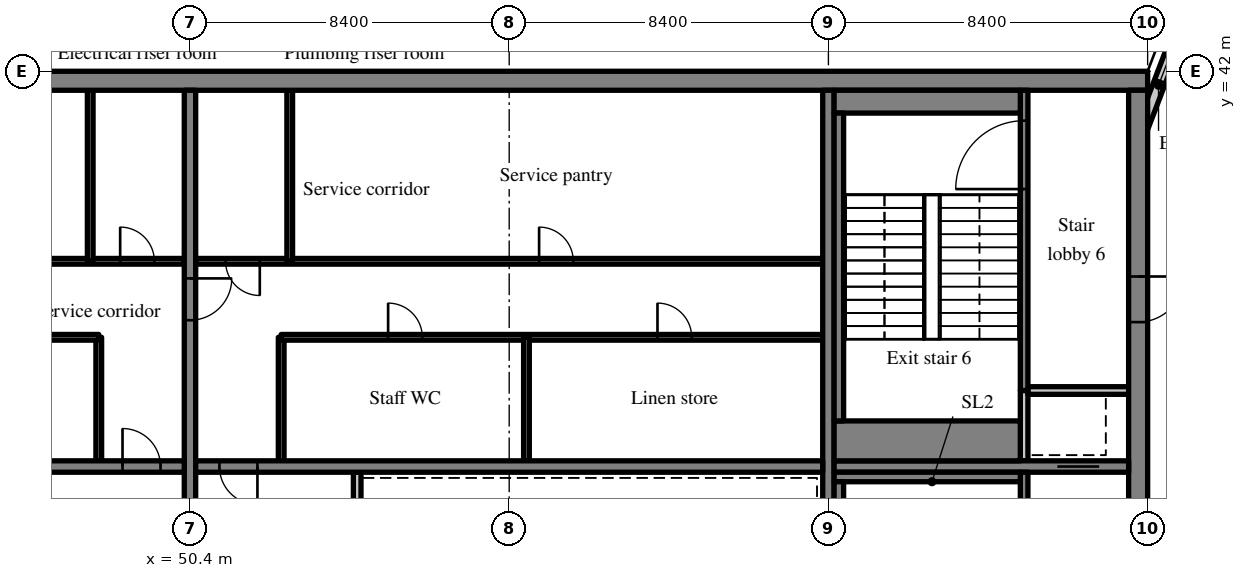
"""IFC4 building model, lengths in metres.
Left out: names, types, materials, properties, quantities, classifications, styles, units other than length and angle.
Written with IfcOpenShell. Run it as: python <this file> out.ifc"""

import sys

from ifc_helpers import new_model, si_unit, direction, frame, frame_2d, origin, place, context, subcontext, project, spatial, rectangle, extrude, source, transform, mapped, element, fill, save


model = new_model("IFC4")
c1 = context("Model", 3, precision=1e-05, world=origin(), true_north=direction((0.0, 1.0)))
c2 = subcontext(c1, "Body", "Model", "MODEL_VIEW")
j1 = project(units=[si_unit("LENGTHUNIT", "METRE"), si_unit("PLANEANGLEUNIT", "RADIAN")], contexts=[c1])
p1 = place(None, origin())
s1 = spatial("IfcSite", under=j1, at=p1, CompositionType="ELEMENT")
p2 = place(p1, origin())
s2 = spatial("IfcBuilding", under=s1, at=p2, CompositionType="ELEMENT")
p3 = place(p2, frame((0.0, 0.0, 285.7)))
s3 = spatial("IfcBuildingStorey", under=s2, at=p3, CompositionType="ELEMENT", Elevation=285.7)
m1 = source(origin(), c2, "Body", "SweptSolid", [
    extrude(rectangle(XDim=50.4, YDim=0.5, at=frame_2d((25.2, 0.0))), origin(), (0.0, 0.0, 1.0), 3.72),
])
p4 = place(p3, frame((25.2, 41.75, 0.0), z_axis=(0.0, 0.0, 1.0), x_axis=(1.0, 0.0, 0.0)))
e1 = element("IfcWall", 1, at=p4, inside=s3, PredefinedType="SHEAR", context=c2, shape_type="MappedRepresentation", body=[
    mapped(m1, transform((0.0, 0.0, 0.0), scale=1.0)),
])
m2 = source(origin(), c2, "Body", "SweptSolid", [
    extrude(rectangle(XDim=19.0, YDim=0.5, at=frame_2d((9.5, 0.0))), origin(), (0.0, 0.0, 1.0), 3.72),
])
p5 = place(p3, frame((75.35, 22.5, 0.0), z_axis=(0.0, 0.0, 1.0), x_axis=(0.0, 1.0, 0.0)))
e2 = element("IfcWall", 2, at=p5, inside=s3, PredefinedType="SHEAR", context=c2, shape_type="MappedRepresentation", body=[
    mapped(m2, transform((0.0, 0.0, 0.0), scale=1.0)),
])
m3 = source(origin(), c2, "Body", "SweptSolid", [
    extrude(rectangle(XDim=1.2, YDim=2.1, at=frame_2d((0.6, 1.05))), frame((0.0, 0.26, 0.0), z_axis=(0.0, -1.0, 0.0), x_axis=(1.0, 0.0, 0.0)), (0.0, 0.0, 1.0), 0.52),
])
p6 = place(p5, frame((12.9, 0.0, 0.0)))
e3 = element("IfcOpeningElement", 3, at=p6, cuts=e2, PredefinedType="OPENING", context=c2, shape_type="MappedRepresentation", body=[
    mapped(m3, transform((0.0, 0.0, 0.0), scale=1.0)),
])
m4 = source(origin(), c2, "Body", "SweptSolid", [
    extrude(rectangle(XDim=19.0, YDim=0.3, at=frame_2d((9.5, 0.0))), origin(), (0.0, 0.0, 1.0), 3.72),
])
p7 = place(p3, frame((50.4, 22.5, 0.0), z_axis=(0.0, 0.0, 1.0), x_axis=(0.0, 1.0, 0.0)))
e4 = element("IfcWall", 4, at=p7, inside=s3, PredefinedType="SHEAR", context=c2, shape_type="MappedRepresentation", body=[
    mapped(m4, transform((0.0, 0.0, 0.0), scale=1.0)),
])
m5 = source(origin(), c2, "Body", "SweptSolid", [
    extrude(rectangle(XDim=1.1, YDim=2.1, at=frame_2d((0.55, 1.05))), frame((0.0, 0.16, 0.0), z_axis=(0.0, -1.0, 0.0), x_axis=(1.0, 0.0, 0.0)), (0.0, 0.0, 1.0), 0.32),
])
p8 = place(p7, frame((12.95, 0.0, 0.0)))
e5 = element("IfcOpeningElement", 5, at=p8, cuts=e4, PredefinedType="OPENING", context=c2, shape_type="MappedRepresentation", body=[
    mapped(m5, transform((0.0, 0.0, 0.0), scale=1.0)),
])
p9 = place(p3, frame((67.2, 22.5, 0.0), z_axis=(0.0, 0.0, 1.0), x_axis=(0.0, 1.0, 0.0)))
e6 = element("IfcWall", 6, at=p9, inside=s3, PredefinedType="SHEAR", context=c2, shape_type="MappedRepresentation", body=[
    mapped(m4, transform((0.0, 0.0, 0.0), scale=1.0)),
])
m6 = source(origin(), c2, "Body", "SweptSolid", [
    extrude(rectangle(XDim=16.5, YDim=0.3, at=frame_2d((8.25, 0.0))), origin(), (0.0, 0.0, 1.0), 3.72),
])
p10 = place(p3, frame((33.75, 31.6, 0.0), z_axis=(0.0, 0.0, 1.0), x_axis=(1.0, 0.0, 0.0)))
e7 = element("IfcWall", 7, at=p10, inside=s3, PredefinedType="SHEAR", context=c2, shape_type="MappedRepresentation", body=[
    mapped(m6, transform((0.0, 0.0, 0.0), scale=1.0)),
])
m7 = source(origin(), c2, "Body", "SweptSolid", [
    extrude(rectangle(XDim=1.0, YDim=2.1, at=frame_2d((0.5, 1.05))), frame((0.0, 0.16, 0.0), z_axis=(0.0, -1.0, 0.0), x_axis=(1.0, 0.0, 0.0)), (0.0, 0.0, 1.0), 0.32),
])
p11 = place(p10, frame((14.875, 0.0, 0.0)))
e8 = element("IfcOpeningElement", 8, at=p11, cuts=e7, PredefinedType="OPENING", context=c2, shape_type="MappedRepresentation", body=[
    mapped(m7, transform((0.0, 0.0, 0.0), scale=1.0)),
])
p12 = place(p3, frame((50.55, 31.6, 0.0), z_axis=(0.0, 0.0, 1.0), x_axis=(1.0, 0.0, 0.0)))
e9 = element("IfcWall", 9, at=p12, inside=s3, PredefinedType="SHEAR", context=c2, shape_type="MappedRepresentation", body=[
    mapped(m6, transform((0.0, 0.0, 0.0), scale=1.0)),
])
p13 = place(p12, frame((0.625, 0.0, 0.0)))
e10 = element("IfcOpeningElement", 10, at=p13, cuts=e9, PredefinedType="OPENING", context=c2, shape_type="MappedRepresentation", body=[
    mapped(m7, transform((0.0, 0.0, 0.0), scale=1.0)),
])
m8 = source(origin(), c2, "Body", "SweptSolid", [
    extrude(rectangle(XDim=7.75, YDim=0.3, at=frame_2d((3.875, 0.0))), origin(), (0.0, 0.0, 1.0), 3.72),
])
p14 = place(p3, frame((67.35, 31.6, 0.0), z_axis=(0.0, 0.0, 1.0), x_axis=(1.0, 0.0, 0.0)))
e11 = element("IfcWall", 11, at=p14, inside=s3, PredefinedType="SHEAR", context=c2, shape_type="MappedRepresentation", body=[
    mapped(m8, transform((0.0, 0.0, 0.0), scale=1.0)),
])
p15 = place(p14, frame((5.875, 0.0, 0.0)))
e12 = element("IfcOpeningElement", 12, at=p15, cuts=e11, PredefinedType="OPENING", context=c2, shape_type="MappedRepresentation", body=[
    mapped(m5, transform((0.0, 0.0, 0.0), scale=1.0)),
])
m9 = source(origin(), c2, "Body", "SweptSolid", [
    extrude(rectangle(XDim=3.559, YDim=0.3, at=frame_2d((1.78, 0.0))), origin(), (0.0, 0.0, 1.0), 3.72),
])
p16 = place(p3, frame((76.523, 43.292, 0.0), z_axis=(0.0, 0.0, 1.0), x_axis=(-0.35779745313, -0.933799219604, 0.0)))
e13 = element("IfcWall", 13, at=p16, inside=s3, PredefinedType="SOLIDWALL", context=c2, shape_type="MappedRepresentation", body=[
    mapped(m9, transform((0.0, 0.0, 0.0), scale=1.0)),
])
m10 = source(origin(), c2, "Body", "SweptSolid", [
    extrude(rectangle(XDim=1.5, YDim=2.0, at=frame_2d((0.75, 1.0))), frame((0.0, 0.16, 0.0), z_axis=(0.0, -1.0, 0.0), x_axis=(1.0, 0.0, 0.0)), (0.0, 0.0, 1.0), 0.32),
])
p17 = place(p16, frame((0.156, 0.0, 0.9)))
e14 = element("IfcOpeningElement", 14, at=p17, cuts=e13, PredefinedType="OPENING", context=c2, shape_type="MappedRepresentation", body=[
    mapped(m10, transform((0.0, 0.0, 0.0), scale=1.0)),
])
m11 = source(origin(), c2, "Body", "SweptSolid", [
    extrude(rectangle(XDim=3.25, YDim=0.15, at=frame_2d((1.625, 0.0))), origin(), (0.0, 0.0, 1.0), 3.72),
])
p18 = place(p3, frame((48.0, 31.75, 0.0), z_axis=(0.0, 0.0, 1.0), x_axis=(0.0, 1.0, 0.0)))
e15 = element("IfcWall", 15, at=p18, inside=s3, PredefinedType="PARTITIONING", context=c2, shape_type="MappedRepresentation", body=[
    mapped(m11, transform((0.0, 0.0, 0.0), scale=1.0)),
])
m12 = source(origin(), c2, "Body", "SweptSolid", [
    extrude(rectangle(XDim=14.25, YDim=0.15, at=frame_2d((7.125, 0.0))), origin(), (0.0, 0.0, 1.0), 3.72),
])
p19 = place(p3, frame((33.75, 35.0, 0.0), z_axis=(0.0, 0.0, 1.0), x_axis=(1.0, 0.0, 0.0)))
e16 = element("IfcWall", 16, at=p19, inside=s3, PredefinedType="PARTITIONING", context=c2, shape_type="MappedRepresentation", body=[
    mapped(m12, transform((0.0, 0.0, 0.0), scale=1.0)),
])
m13 = source(origin(), c2, "Body", "SweptSolid", [
    extrude(rectangle(XDim=0.9, YDim=2.1, at=frame_2d((0.45, 1.05))), frame((0.0, 0.085, 0.0), z_axis=(0.0, -1.0, 0.0), x_axis=(1.0, 0.0, 0.0)), (0.0, 0.0, 1.0), 0.17),
])
p20 = place(p19, frame((6.637, 0.0, 0.0)))
e17 = element("IfcOpeningElement", 17, at=p20, cuts=e16, PredefinedType="OPENING", context=c2, shape_type="MappedRepresentation", body=[
    mapped(m13, transform((0.0, 0.0, 0.0), scale=1.0)),
])
m14 = source(origin(), c2, "Body", "SweptSolid", [
    extrude(rectangle(XDim=16.5, YDim=0.15, at=frame_2d((8.25, 0.0))), origin(), (0.0, 0.0, 1.0), 3.72),
])
p21 = place(p3, frame((33.75, 37.0, 0.0), z_axis=(0.0, 0.0, 1.0), x_axis=(1.0, 0.0, 0.0)))
e18 = element("IfcWall", 18, at=p21, inside=s3, PredefinedType="PARTITIONING", context=c2, shape_type="MappedRepresentation", body=[
    mapped(m14, transform((0.0, 0.0, 0.0), scale=1.0)),
])
p22 = place(p21, frame((0.787, 0.0, 0.0)))
e19 = element("IfcOpeningElement", 19, at=p22, cuts=e18, PredefinedType="OPENING", context=c2, shape_type="MappedRepresentation", body=[
    mapped(m13, transform((0.0, 0.0, 0.0), scale=1.0)),
])
p23 = place(p21, frame((3.675, 0.0, 0.0)))
e20 = element("IfcOpeningElement", 20, at=p23, cuts=e18, PredefinedType="OPENING", context=c2, shape_type="MappedRepresentation", body=[
    mapped(m13, transform((0.0, 0.0, 0.0), scale=1.0)),
])
p24 = place(p21, frame((9.45, 0.0, 0.0)))
e21 = element("IfcOpeningElement", 21, at=p24, cuts=e18, PredefinedType="OPENING", context=c2, shape_type="MappedRepresentation", body=[
    mapped(m13, transform((0.0, 0.0, 0.0), scale=1.0)),
])
p25 = place(p21, frame((14.813, 0.0, 0.0)))
e22 = element("IfcOpeningElement", 22, at=p25, cuts=e18, PredefinedType="OPENING", context=c2, shape_type="MappedRepresentation", body=[
    mapped(m13, transform((0.0, 0.0, 0.0), scale=1.0)),
])
m15 = source(origin(), c2, "Body", "SweptSolid", [
    extrude(rectangle(XDim=4.5, YDim=0.15, at=frame_2d((2.25, 0.0))), origin(), (0.0, 0.0, 1.0), 3.72),
])
p26 = place(p3, frame((47.775, 37.0, 0.0), z_axis=(0.0, 0.0, 1.0), x_axis=(0.0, 1.0, 0.0)))
e23 = element("IfcWall", 23, at=p26, inside=s3, PredefinedType="PARTITIONING", context=c2, shape_type="MappedRepresentation", body=[
    mapped(m15, transform((0.0, 0.0, 0.0), scale=1.0)),
])
m16 = source(origin(), c2, "Body", "SweptSolid", [
    extrude(rectangle(XDim=2.65, YDim=0.2, at=frame_2d((1.325, 0.0))), origin(), (0.0, 0.0, 1.0), 3.72),
])
p27 = place(p3, frame((54.8, 28.8, 0.0), z_axis=(0.0, 0.0, 1.0), x_axis=(0.0, 1.0, 0.0)))
e24 = element("IfcWall", 24, at=p27, inside=s3, PredefinedType="SOLIDWALL", context=c2, shape_type="MappedRepresentation", body=[
    mapped(m16, transform((0.0, 0.0, 0.0), scale=1.0)),
])
p28 = place(p3, frame((52.8, 31.75, 0.0), z_axis=(0.0, 0.0, 1.0), x_axis=(0.0, 1.0, 0.0)))
e25 = element("IfcWall", 25, at=p28, inside=s3, PredefinedType="PARTITIONING", context=c2, shape_type="MappedRepresentation", body=[
    mapped(m11, transform((0.0, 0.0, 0.0), scale=1.0)),
])
p29 = place(p3, frame((67.05, 35.0, 0.0), z_axis=(0.0, 0.0, 1.0), x_axis=(-1.0, 0.0, 0.0)))
e26 = element("IfcWall", 26, at=p29, inside=s3, PredefinedType="PARTITIONING", context=c2, shape_type="MappedRepresentation", body=[
    mapped(m12, transform((0.0, 0.0, 0.0), scale=1.0)),
])
p30 = place(p29, frame((3.448, 0.0, 0.0)))
e27 = element("IfcOpeningElement", 27, at=p30, cuts=e26, PredefinedType="OPENING", context=c2, shape_type="MappedRepresentation", body=[
    mapped(m13, transform((0.0, 0.0, 0.0), scale=1.0)),
])
p31 = place(p29, frame((10.536, 0.0, 0.0)))
e28 = element("IfcOpeningElement", 28, at=p31, cuts=e26, PredefinedType="OPENING", context=c2, shape_type="MappedRepresentation", body=[
    mapped(m13, transform((0.0, 0.0, 0.0), scale=1.0)),
])
p32 = place(p3, frame((67.05, 37.0, 0.0), z_axis=(0.0, 0.0, 1.0), x_axis=(-1.0, 0.0, 0.0)))
e29 = element("IfcWall", 29, at=p32, inside=s3, PredefinedType="PARTITIONING", context=c2, shape_type="MappedRepresentation", body=[
    mapped(m14, transform((0.0, 0.0, 0.0), scale=1.0)),
])
p33 = place(p32, frame((6.563, 0.0, 0.0)))
e30 = element("IfcOpeningElement", 30, at=p33, cuts=e29, PredefinedType="OPENING", context=c2, shape_type="MappedRepresentation", body=[
    mapped(m13, transform((0.0, 0.0, 0.0), scale=1.0)),
])
p34 = place(p32, frame((14.813, 0.0, 0.0)))
e31 = element("IfcOpeningElement", 31, at=p34, cuts=e29, PredefinedType="OPENING", context=c2, shape_type="MappedRepresentation", body=[
    mapped(m13, transform((0.0, 0.0, 0.0), scale=1.0)),
])
p35 = place(p3, frame((59.254, 31.75, 0.0), z_axis=(0.0, 0.0, 1.0), x_axis=(0.0, 1.0, 0.0)))
e32 = element("IfcWall", 32, at=p35, inside=s3, PredefinedType="PARTITIONING", context=c2, shape_type="MappedRepresentation", body=[
    mapped(m11, transform((0.0, 0.0, 0.0), scale=1.0)),
])
p36 = place(p3, frame((53.025, 37.0, 0.0), z_axis=(0.0, 0.0, 1.0), x_axis=(0.0, 1.0, 0.0)))
e33 = element("IfcWall", 33, at=p36, inside=s3, PredefinedType="PARTITIONING", context=c2, shape_type="MappedRepresentation", body=[
    mapped(m15, transform((0.0, 0.0, 0.0), scale=1.0)),
])
m17 = source(origin(), c2, "Body", "SweptSolid", [
    extrude(rectangle(XDim=8.95, YDim=0.2, at=frame_2d((4.475, 0.0))), origin(), (0.0, 0.0, 1.0), 3.72),
])
p37 = place(p3, frame((72.35, 22.5, 0.0), z_axis=(0.0, 0.0, 1.0), x_axis=(0.0, 1.0, 0.0)))
e34 = element("IfcWall", 34, at=p37, inside=s3, PredefinedType="SOLIDWALL", context=c2, shape_type="MappedRepresentation", body=[
    mapped(m17, transform((0.0, 0.0, 0.0), scale=1.0)),
])
m18 = source(origin(), c2, "Body", "SweptSolid", [
    extrude(rectangle(XDim=1.2, YDim=2.1, at=frame_2d((0.6, 1.05))), frame((0.0, 0.11, 0.0), z_axis=(0.0, -1.0, 0.0), x_axis=(1.0, 0.0, 0.0)), (0.0, 0.0, 1.0), 0.22),
])
p38 = place(p37, frame((7.0, 0.0, 0.0)))
e35 = element("IfcOpeningElement", 35, at=p38, cuts=e34, PredefinedType="OPENING", context=c2, shape_type="MappedRepresentation", body=[
    mapped(m18, transform((0.0, 0.0, 0.0), scale=1.0)),
])
m19 = source(origin(), c2, "Body", "SweptSolid", [
    extrude(rectangle(XDim=1.85, YDim=0.2, at=frame_2d((0.925, 0.0))), origin(), (0.0, 0.0, 1.0), 3.72),
])
p39 = place(p3, frame((72.35, 31.75, 0.0), z_axis=(0.0, 0.0, 1.0), x_axis=(0.0, 1.0, 0.0)))
e36 = element("IfcWall", 36, at=p39, inside=s3, PredefinedType="SOLIDWALL", context=c2, shape_type="MappedRepresentation", body=[
    mapped(m19, transform((0.0, 0.0, 0.0), scale=1.0)),
])
m20 = source(origin(), c2, "Body", "SweptSolid", [
    extrude(rectangle(XDim=2.65, YDim=0.2, at=frame_2d((1.325, 0.0))), origin(), (0.0, 0.0, 1.0), 3.72),
])
p40 = place(p3, frame((72.45, 33.6, 0.0), z_axis=(0.0, 0.0, 1.0), x_axis=(1.0, 0.0, 0.0)))
e37 = element("IfcWall", 37, at=p40, inside=s3, PredefinedType="SOLIDWALL", context=c2, shape_type="MappedRepresentation", body=[
    mapped(m20, transform((0.0, 0.0, 0.0), scale=1.0)),
])
m21 = source(origin(), c2, "Body", "SweptSolid", [
    extrude(rectangle(XDim=7.9, YDim=0.2, at=frame_2d((3.95, 0.0))), origin(), (0.0, 0.0, 1.0), 3.72),
])
p41 = place(p3, frame((72.35, 33.6, 0.0), z_axis=(0.0, 0.0, 1.0), x_axis=(0.0, 1.0, 0.0)))
e38 = element("IfcWall", 38, at=p41, inside=s3, PredefinedType="SOLIDWALL", context=c2, shape_type="MappedRepresentation", body=[
    mapped(m21, transform((0.0, 0.0, 0.0), scale=1.0)),
])
m22 = source(origin(), c2, "Body", "SweptSolid", [
    extrude(rectangle(XDim=1.8, YDim=2.1, at=frame_2d((0.9, 1.05))), frame((0.0, 0.11, 0.0), z_axis=(0.0, -1.0, 0.0), x_axis=(1.0, 0.0, 0.0)), (0.0, 0.0, 1.0), 0.22),
])
p42 = place(p41, frame((5.3, 0.0, 0.0)))
e39 = element("IfcOpeningElement", 39, at=p42, cuts=e38, PredefinedType="OPENING", context=c2, shape_type="MappedRepresentation", body=[
    mapped(m22, transform((0.0, 0.0, 0.0), scale=1.0)),
])
m23 = source(origin(), c2, "Body", "SweptSolid", [
    extrude(rectangle(XDim=4.9, YDim=0.25, at=frame_2d((2.45, 0.0))), origin(), (0.0, 0.0, 1.0), 3.72),
])
p43 = place(p3, frame((67.35, 31.325, 0.0), z_axis=(0.0, 0.0, 1.0), x_axis=(1.0, 0.0, 0.0)))
e40 = element("IfcWall", 40, at=p43, inside=s3, PredefinedType="SOLIDWALL", context=c2, shape_type="MappedRepresentation", body=[
    mapped(m23, transform((0.0, 0.0, 0.0), scale=1.0)),
])
m24 = source(origin(), c2, "Body", "SweptSolid", [
    extrude(rectangle(XDim=8.1, YDim=0.25, at=frame_2d((4.05, 0.0))), origin(), (0.0, 0.0, 1.0), 3.72),
])
p44 = place(p3, frame((67.475, 23.1, 0.0), z_axis=(0.0, 0.0, 1.0), x_axis=(0.0, 1.0, 0.0)))
e41 = element("IfcWall", 41, at=p44, inside=s3, PredefinedType="SOLIDWALL", context=c2, shape_type="MappedRepresentation", body=[
    mapped(m24, transform((0.0, 0.0, 0.0), scale=1.0)),
])
m25 = source(origin(), c2, "Body", "SweptSolid", [
    extrude(rectangle(XDim=4.9, YDim=0.6, at=frame_2d((2.45, 0.0))), origin(), (0.0, 0.0, 1.0), 3.72),
])
p45 = place(p3, frame((67.35, 41.2, 0.0), z_axis=(0.0, 0.0, 1.0), x_axis=(1.0, 0.0, 0.0)))
e42 = element("IfcWall", 42, at=p45, inside=s3, PredefinedType="SOLIDWALL", context=c2, shape_type="MappedRepresentation", body=[
    mapped(m25, transform((0.0, 0.0, 0.0), scale=1.0)),
])
m26 = source(origin(), c2, "Body", "SweptSolid", [
    extrude(rectangle(XDim=4.9, YDim=1.05, at=frame_2d((2.45, 0.0))), origin(), (0.0, 0.0, 1.0), 3.72),
])
p46 = place(p3, frame((67.35, 32.275, 0.0), z_axis=(0.0, 0.0, 1.0), x_axis=(1.0, 0.0, 0.0)))
e43 = element("IfcWall", 43, at=p46, inside=s3, PredefinedType="SOLIDWALL", context=c2, shape_type="MappedRepresentation", body=[
    mapped(m26, transform((0.0, 0.0, 0.0), scale=1.0)),
])
p47 = place(p3, frame((67.475, 32.8, 0.0), z_axis=(0.0, 0.0, 1.0), x_axis=(0.0, 1.0, 0.0)))
e44 = element("IfcWall", 44, at=p47, inside=s3, PredefinedType="SOLIDWALL", context=c2, shape_type="MappedRepresentation", body=[
    mapped(m24, transform((0.0, 0.0, 0.0), scale=1.0)),
])
m27 = source(origin(), c2, "Body", "SweptSolid", [
    extrude(rectangle(XDim=1.5, YDim=2.0, at=frame_2d((0.75, 1.0))), frame((0.0, 0.03, 0.0), z_axis=(0.0, -1.0, 0.0), x_axis=(1.0, 0.0, 0.0)), (0.0, 0.0, 1.0), 0.06),
])
p48 = place(p17, origin())
e45 = element("IfcWindow", 45, at=p48, inside=s3, PartitioningType="SINGLE_PANEL", PredefinedType="WINDOW", context=c2, shape_type="MappedRepresentation", body=[
    mapped(m27, transform((0.0, 0.0, 0.0), scale=1.0)),
])
fill(e14, e45)
m28 = source(origin(), c2, "Body", "SweptSolid", [
    extrude(rectangle(XDim=1.0, YDim=2.1, at=frame_2d((0.5, 1.05))), frame((0.0, 0.025, 0.0), z_axis=(0.0, -1.0, 0.0), x_axis=(1.0, 0.0, 0.0)), (0.0, 0.0, 1.0), 0.05),
])
p49 = place(p11, origin())
e46 = element("IfcDoor", 46, at=p49, inside=s3, OperationType="SINGLE_SWING_LEFT", PredefinedType="DOOR", context=c2, shape_type="MappedRepresentation", body=[
    mapped(m28, transform((0.0, 0.0, 0.0), scale=1.0)),
])
fill(e8, e46)
m29 = source(origin(), c2, "Body", "SweptSolid", [
    extrude(rectangle(XDim=0.9, YDim=2.1, at=frame_2d((0.45, 1.05))), frame((0.0, 0.025, 0.0), z_axis=(0.0, -1.0, 0.0), x_axis=(1.0, 0.0, 0.0)), (0.0, 0.0, 1.0), 0.05),
])
p50 = place(p25, origin())
e47 = element("IfcDoor", 47, at=p50, inside=s3, OperationType="SINGLE_SWING_LEFT", PredefinedType="DOOR", context=c2, shape_type="MappedRepresentation", body=[
    mapped(m29, transform((0.0, 0.0, 0.0), scale=1.0)),
])
fill(e22, e47)
p51 = place(p13, origin())
e48 = element("IfcDoor", 48, at=p51, inside=s3, OperationType="SINGLE_SWING_RIGHT", PredefinedType="DOOR", context=c2, shape_type="MappedRepresentation", body=[
    mapped(m28, transform((0.0, 0.0, 0.0), scale=1.0)),
])
fill(e10, e48)
p52 = place(p30, origin())
e49 = element("IfcDoor", 49, at=p52, inside=s3, OperationType="SINGLE_SWING_RIGHT", PredefinedType="DOOR", context=c2, shape_type="MappedRepresentation", body=[
    mapped(m29, transform((0.0, 0.0, 0.0), scale=1.0)),
])
fill(e27, e49)
p53 = place(p31, origin())
e50 = element("IfcDoor", 50, at=p53, inside=s3, OperationType="SINGLE_SWING_RIGHT", PredefinedType="DOOR", context=c2, shape_type="MappedRepresentation", body=[
    mapped(m29, transform((0.0, 0.0, 0.0), scale=1.0)),
])
fill(e28, e50)
p54 = place(p33, origin())
e51 = element("IfcDoor", 51, at=p54, inside=s3, OperationType="SINGLE_SWING_RIGHT", PredefinedType="DOOR", context=c2, shape_type="MappedRepresentation", body=[
    mapped(m29, transform((0.0, 0.0, 0.0), scale=1.0)),
])
fill(e30, e51)
p55 = place(p34, origin())
e52 = element("IfcDoor", 52, at=p55, inside=s3, OperationType="SINGLE_SWING_LEFT", PredefinedType="DOOR", context=c2, shape_type="MappedRepresentation", body=[
    mapped(m29, transform((0.0, 0.0, 0.0), scale=1.0)),
])
fill(e31, e52)
m30 = source(origin(), c2, "Body", "SweptSolid", [
    extrude(rectangle(XDim=1.1, YDim=2.1, at=frame_2d((0.55, 1.05))), frame((0.0, 0.025, 0.0), z_axis=(0.0, -1.0, 0.0), x_axis=(1.0, 0.0, 0.0)), (0.0, 0.0, 1.0), 0.05),
])
p56 = place(p15, origin())
e53 = element("IfcDoor", 53, at=p56, inside=s3, OperationType="SLIDING_TO_RIGHT", PredefinedType="DOOR", context=c2, shape_type="MappedRepresentation", body=[
    mapped(m30, transform((0.0, 0.0, 0.0), scale=1.0)),
])
fill(e12, e53)
m31 = source(origin(), c2, "Body", "SweptSolid", [
    extrude(rectangle(XDim=1.8, YDim=2.1, at=frame_2d((0.9, 1.05))), frame((0.0, 0.025, 0.0), z_axis=(0.0, -1.0, 0.0), x_axis=(1.0, 0.0, 0.0)), (0.0, 0.0, 1.0), 0.05),
])
p57 = place(p42, origin())
e54 = element("IfcDoor", 54, at=p57, inside=s3, OperationType="SINGLE_SWING_LEFT", PredefinedType="DOOR", context=c2, shape_type="MappedRepresentation", body=[
    mapped(m31, transform((0.0, 0.0, 0.0), scale=1.0)),
])
fill(e39, e54)
m32 = source(origin(), c2, "Body", "SweptSolid", [
    extrude(rectangle(XDim=1.2, YDim=2.1, at=frame_2d((0.6, 1.05))), frame((0.0, 0.025, 0.0), z_axis=(0.0, -1.0, 0.0), x_axis=(1.0, 0.0, 0.0)), (0.0, 0.0, 1.0), 0.05),
])
p58 = place(p6, origin())
e55 = element("IfcDoor", 55, at=p58, inside=s3, OperationType="SINGLE_SWING_RIGHT", PredefinedType="DOOR", context=c2, shape_type="MappedRepresentation", body=[
    mapped(m32, transform((0.0, 0.0, 0.0), scale=1.0)),
])
fill(e3, e55)
p59 = place(p8, origin())
e56 = element("IfcDoor", 56, at=p59, inside=s3, OperationType="SINGLE_SWING_RIGHT", PredefinedType="DOOR", context=c2, shape_type="MappedRepresentation", body=[
    mapped(m30, transform((0.0, 0.0, 0.0), scale=1.0)),
])
fill(e5, e56)
save(model, sys.argv[1])
